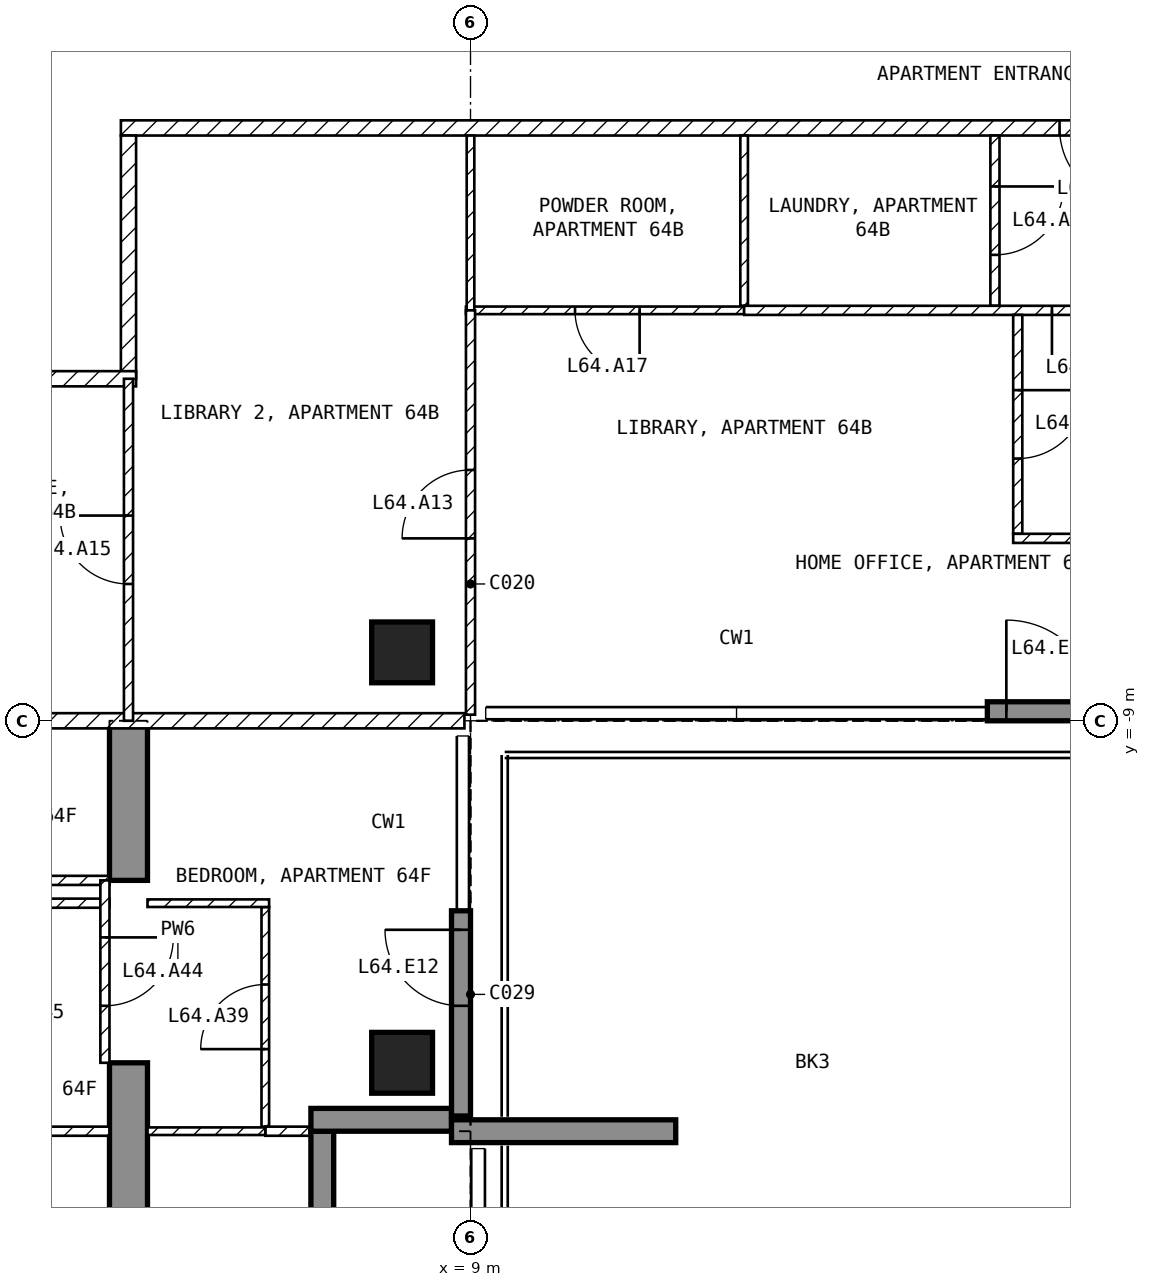
"""IFC4 building model, lengths in metres.
Left out: names, types, materials, properties, quantities, classifications, styles, units other than length and angle.
Written with IfcOpenShell. Run it as: python <this file> out.ifc"""

import sys

from ifc_helpers import new_model, si_unit, direction, frame, frame_2d, origin, origin_2d, place, context, subcontext, project, spatial, polyline, rectangle, outline, extrude, element, fill, save


model = new_model("IFC4")
c1 = context("Model", 3, precision=1e-05, world=origin(), true_north=direction((0.0, 1.0)))
c2 = subcontext(c1, "Body", "Model", "MODEL_VIEW")
j1 = project(units=[si_unit("LENGTHUNIT", "METRE"), si_unit("PLANEANGLEUNIT", "RADIAN")], contexts=[c1])
p1 = place(None, origin())
s1 = spatial("IfcSite", under=j1, at=p1, CompositionType="ELEMENT")
p2 = place(p1, origin())
s2 = spatial("IfcBuilding", under=s1, at=p2, CompositionType="ELEMENT")
p3 = place(p2, frame((0.0, 0.0, 253.5)))
s3 = spatial("IfcBuildingStorey", under=s2, at=p3, CompositionType="ELEMENT", Elevation=253.5)
for number, where, z_axis, x_axis in (
    (1, (8.1, -13.5, -0.25), (0.0, 0.0, 1.0), (1.0, 0.0, 0.0)),
    (2, (8.1, -8.1, -0.25), (0.0, 0.0, 1.0), (1.0, 0.0, 0.0)),
):
    element("IfcColumn", number, at=place(p3, frame(where, z_axis=z_axis, x_axis=x_axis)), inside=s3, PredefinedType="COLUMN", context=c2, shape_type="SweptSolid", body=[
        extrude(rectangle(XDim=0.8, YDim=0.8, at=origin_2d()), origin(), (0.0, 0.0, 1.0), 3.5),
    ])
p4 = place(p3, frame((4.25, -16.7, -0.25), z_axis=(1.0, 0.0, 0.0), x_axis=(0.0, 1.0, 0.0)))
e3 = element("IfcWall", 3, at=p4, inside=s3, PredefinedType="SHEAR", context=c2, shape_type="SweptSolid", body=[
    extrude(outline(polyline([(0.0, 0.0), (3.2, 0.0), (3.2, 2.65), (5.6, 2.65), (5.6, 0.0), (7.7, 0.0), (7.7, 3.5), (0.0, 3.5), (0.0, 0.0)])), origin(), (0.0, 0.0, 1.0), 0.5),
])
p5 = place(p3, frame((8.875, -14.2, 0.0), z_axis=(0.0, 0.0, 1.0), x_axis=(0.0, 1.0, 0.0)))
e4 = element("IfcWall", 4, at=p5, inside=s3, PredefinedType="SOLIDWALL", context=c2, shape_type="SweptSolid", body=[
    extrude(rectangle(XDim=2.7, YDim=0.25, at=frame_2d((1.35, 0.0))), origin(), (0.0, 0.0, 1.0), 3.25),
])
p6 = place(p5, frame((1.45, 0.0, 0.0)))
e5 = element("IfcOpeningElement", 5, at=p6, cuts=e4, PredefinedType="OPENING", context=c2, shape_type="SweptSolid", body=[
    extrude(rectangle(XDim=1.0, YDim=2.4, at=frame_2d((0.5, 1.2))), frame((0.0, 0.135, 0.0), z_axis=(0.0, -1.0, 0.0), x_axis=(1.0, 0.0, 0.0)), (0.0, 0.0, 1.0), 0.27),
])
p7 = place(p3, frame((15.8, -8.875, 0.0), z_axis=(0.0, 0.0, 1.0), x_axis=(1.0, 0.0, 0.0)))
e6 = element("IfcWall", 6, at=p7, inside=s3, PredefinedType="SOLIDWALL", context=c2, shape_type="SweptSolid", body=[
    extrude(rectangle(XDim=2.14, YDim=0.25, at=frame_2d((1.07, 0.0))), origin(), (0.0, 0.0, 1.0), 3.25),
])
p8 = place(p7, frame((0.25, 0.0, 0.0)))
e7 = element("IfcOpeningElement", 7, at=p8, cuts=e6, PredefinedType="OPENING", context=c2, shape_type="SweptSolid", body=[
    extrude(rectangle(XDim=1.2, YDim=2.4, at=frame_2d((0.6, 1.2))), frame((0.0, 0.135, 0.0), z_axis=(0.0, -1.0, 0.0), x_axis=(1.0, 0.0, 0.0)), (0.0, 0.0, 1.0), 0.27),
])
p9 = place(p3, frame((7.05, -16.2, 0.0), z_axis=(0.0, 0.0, 1.0), x_axis=(0.0, 1.0, 0.0)))
e8 = element("IfcWall", 8, at=p9, inside=s3, PredefinedType="SOLIDWALL", context=c2, shape_type="SweptSolid", body=[
    extrude(rectangle(XDim=1.8, YDim=0.3, at=frame_2d((0.9, 0.0))), origin(), (0.0, 0.0, 1.0), 3.25),
])
p10 = place(p3, frame((6.9, -14.25, 0.0), z_axis=(0.0, 0.0, 1.0), x_axis=(1.0, 0.0, 0.0)))
e9 = element("IfcWall", 9, at=p10, inside=s3, PredefinedType="SOLIDWALL", context=c2, shape_type="SweptSolid", body=[
    extrude(rectangle(XDim=1.85, YDim=0.3, at=frame_2d((0.925, 0.0))), origin(), (0.0, 0.0, 1.0), 3.25),
])
p11 = place(p3, frame((8.75, -14.4, 0.0), z_axis=(0.0, 0.0, 1.0), x_axis=(1.0, 0.0, 0.0)))
e10 = element("IfcWall", 10, at=p11, inside=s3, PredefinedType="SOLIDWALL", context=c2, shape_type="SweptSolid", body=[
    extrude(rectangle(XDim=2.95, YDim=0.3, at=frame_2d((1.475, 0.0))), origin(), (0.0, 0.0, 1.0), 3.25),
])
p12 = place(p3, frame((21.6, -1.2, 0.0), z_axis=(0.0, 0.0, 1.0), x_axis=(-1.0, 0.0, 0.0)))
e11 = element("IfcWall", 11, at=p12, inside=s3, PredefinedType="PARTITIONING", context=c2, shape_type="SweptSolid", body=[
    extrude(rectangle(XDim=17.2, YDim=0.2, at=frame_2d((8.6, 0.0))), origin(), (0.0, 0.0, 1.0), 3.25),
])
p13 = place(p12, frame((3.85, 0.0, 0.0)))
e12 = element("IfcOpeningElement", 12, at=p13, cuts=e11, PredefinedType="OPENING", context=c2, shape_type="SweptSolid", body=[
    extrude(rectangle(XDim=1.0, YDim=2.1, at=frame_2d((0.5, 1.05))), frame((0.0, 0.11, 0.0), z_axis=(0.0, -1.0, 0.0), x_axis=(1.0, 0.0, 0.0)), (0.0, 0.0, 1.0), 0.22),
])
p14 = place(p3, frame((4.5, -1.3, 0.0), z_axis=(0.0, 0.0, 1.0), x_axis=(0.0, -1.0, 0.0)))
e13 = element("IfcWall", 13, at=p14, inside=s3, PredefinedType="PARTITIONING", context=c2, shape_type="SweptSolid", body=[
    extrude(rectangle(XDim=3.2, YDim=0.2, at=frame_2d((1.6, 0.0))), origin(), (0.0, 0.0, 1.0), 3.25),
])
p15 = place(p3, frame((4.6, -4.5, 0.0), z_axis=(0.0, 0.0, 1.0), x_axis=(-1.0, 0.0, 0.0)))
e14 = element("IfcWall", 14, at=p15, inside=s3, PredefinedType="PARTITIONING", context=c2, shape_type="SweptSolid", body=[
    extrude(rectangle(XDim=3.5, YDim=0.2, at=frame_2d((1.75, 0.0))), origin(), (0.0, 0.0, 1.0), 3.25),
])
p16 = place(p3, frame((8.92, -9.0, 0.0), z_axis=(0.0, 0.0, 1.0), x_axis=(-1.0, 0.0, 0.0)))
e15 = element("IfcWall", 15, at=p16, inside=s3, PredefinedType="PARTITIONING", context=c2, shape_type="SweptSolid", body=[
    extrude(rectangle(XDim=17.84, YDim=0.2, at=frame_2d((8.92, 0.0))), origin(), (0.0, 0.0, 1.0), 3.25),
])
p17 = place(p16, frame((8.42, 0.0, 0.0)))
e16 = element("IfcOpeningElement", 16, at=p17, cuts=e15, PredefinedType="OPENING", context=c2, shape_type="SweptSolid", body=[
    extrude(rectangle(XDim=1.0, YDim=2.1, at=frame_2d((0.5, 1.05))), frame((0.0, 0.11, 0.0), z_axis=(0.0, -1.0, 0.0), x_axis=(1.0, 0.0, 0.0)), (0.0, 0.0, 1.0), 0.22),
])
p18 = place(p3, frame((12.6, -1.3, 0.0), z_axis=(0.0, 0.0, 1.0), x_axis=(0.0, -1.0, 0.0)))
e17 = element("IfcWall", 17, at=p18, inside=s3, PredefinedType="PARTITIONING", context=c2, shape_type="SweptSolid", body=[
    extrude(rectangle(XDim=2.24, YDim=0.1, at=frame_2d((1.12, 0.0))), origin(), (0.0, 0.0, 1.0), 3.25),
])
p19 = place(p3, frame((12.6, -3.6, 0.0), z_axis=(0.0, 0.0, 1.0), x_axis=(-1.0, 0.0, 0.0)))
e18 = element("IfcWall", 18, at=p19, inside=s3, PredefinedType="PARTITIONING", context=c2, shape_type="SweptSolid", body=[
    extrude(rectangle(XDim=3.66, YDim=0.1, at=frame_2d((1.83, 0.0))), origin(), (0.0, 0.0, 1.0), 3.25),
])
p20 = place(p19, frame((1.375, 0.0, 0.0)))
e19 = element("IfcOpeningElement", 19, at=p20, cuts=e18, PredefinedType="OPENING", context=c2, shape_type="SweptSolid", body=[
    extrude(rectangle(XDim=0.85, YDim=2.1, at=frame_2d((0.425, 1.05))), frame((0.0, 0.06, 0.0), z_axis=(0.0, -1.0, 0.0), x_axis=(1.0, 0.0, 0.0)), (0.0, 0.0, 1.0), 0.12),
])
p21 = place(p3, frame((9.0, -3.6, 0.0), z_axis=(0.0, 0.0, 1.0), x_axis=(0.0, 1.0, 0.0)))
e20 = element("IfcWall", 20, at=p21, inside=s3, PredefinedType="PARTITIONING", context=c2, shape_type="SweptSolid", body=[
    extrude(rectangle(XDim=2.3, YDim=0.1, at=frame_2d((1.15, 0.0))), origin(), (0.0, 0.0, 1.0), 3.25),
])
p22 = place(p3, frame((15.9, -1.3, 0.0), z_axis=(0.0, 0.0, 1.0), x_axis=(0.0, -1.0, 0.0)))
e21 = element("IfcWall", 21, at=p22, inside=s3, PredefinedType="PARTITIONING", context=c2, shape_type="SweptSolid", body=[
    extrude(rectangle(XDim=2.24, YDim=0.12, at=frame_2d((1.12, 0.0))), origin(), (0.0, 0.0, 1.0), 3.25),
])
p23 = place(p22, frame((0.67, 0.0, 0.0)))
e22 = element("IfcOpeningElement", 22, at=p23, cuts=e21, PredefinedType="OPENING", context=c2, shape_type="SweptSolid", body=[
    extrude(rectangle(XDim=0.9, YDim=2.1, at=frame_2d((0.45, 1.05))), frame((0.0, 0.07, 0.0), z_axis=(0.0, -1.0, 0.0), x_axis=(1.0, 0.0, 0.0)), (0.0, 0.0, 1.0), 0.14),
])
p24 = place(p3, frame((21.6, -3.6, 0.0), z_axis=(0.0, 0.0, 1.0), x_axis=(-1.0, 0.0, 0.0)))
e23 = element("IfcWall", 23, at=p24, inside=s3, PredefinedType="PARTITIONING", context=c2, shape_type="SweptSolid", body=[
    extrude(rectangle(XDim=9.0, YDim=0.12, at=frame_2d((4.5, 0.0))), origin(), (0.0, 0.0, 1.0), 3.25),
])
p25 = place(p24, frame((4.05, 0.0, 0.0)))
e24 = element("IfcOpeningElement", 24, at=p25, cuts=e23, PredefinedType="OPENING", context=c2, shape_type="SweptSolid", body=[
    extrude(rectangle(XDim=0.9, YDim=2.1, at=frame_2d((0.45, 1.05))), frame((0.0, 0.07, 0.0), z_axis=(0.0, -1.0, 0.0), x_axis=(1.0, 0.0, 0.0)), (0.0, 0.0, 1.0), 0.14),
])
p26 = place(p3, frame((16.2, -3.66, 0.0), z_axis=(0.0, 0.0, 1.0), x_axis=(0.0, -1.0, 0.0)))
e25 = element("IfcWall", 25, at=p26, inside=s3, PredefinedType="PARTITIONING", context=c2, shape_type="SweptSolid", body=[
    extrude(rectangle(XDim=2.88, YDim=0.12, at=frame_2d((1.44, 0.0))), origin(), (0.0, 0.0, 1.0), 3.25),
])
p27 = place(p26, frame((0.99, 0.0, 0.0)))
e26 = element("IfcOpeningElement", 26, at=p27, cuts=e25, PredefinedType="OPENING", context=c2, shape_type="SweptSolid", body=[
    extrude(rectangle(XDim=0.9, YDim=2.1, at=frame_2d((0.45, 1.05))), frame((0.0, 0.07, 0.0), z_axis=(0.0, -1.0, 0.0), x_axis=(1.0, 0.0, 0.0)), (0.0, 0.0, 1.0), 0.14),
])
p28 = place(p3, frame((16.14, -6.6, 0.0), z_axis=(0.0, 0.0, 1.0), x_axis=(1.0, 0.0, 0.0)))
e27 = element("IfcWall", 27, at=p28, inside=s3, PredefinedType="PARTITIONING", context=c2, shape_type="SweptSolid", body=[
    extrude(rectangle(XDim=1.92, YDim=0.12, at=frame_2d((0.96, 0.0))), origin(), (0.0, 0.0, 1.0), 3.25),
])
p29 = place(p3, frame((9.0, -8.92, 0.0), z_axis=(0.0, 0.0, 1.0), x_axis=(0.0, 1.0, 0.0)))
e28 = element("IfcWall", 28, at=p29, inside=s3, PredefinedType="PARTITIONING", context=c2, shape_type="SweptSolid", body=[
    extrude(rectangle(XDim=5.32, YDim=0.12, at=frame_2d((2.66, 0.0))), origin(), (0.0, 0.0, 1.0), 3.25),
])
p30 = place(p29, frame((2.32, 0.0, 0.0)))
e29 = element("IfcOpeningElement", 29, at=p30, cuts=e28, PredefinedType="OPENING", context=c2, shape_type="SweptSolid", body=[
    extrude(rectangle(XDim=0.9, YDim=2.1, at=frame_2d((0.45, 1.05))), frame((0.0, 0.07, 0.0), z_axis=(0.0, -1.0, 0.0), x_axis=(1.0, 0.0, 0.0)), (0.0, 0.0, 1.0), 0.14),
])
p31 = place(p3, frame((4.5, -9.0, 0.0), z_axis=(0.0, 0.0, 1.0), x_axis=(0.0, 1.0, 0.0)))
e30 = element("IfcWall", 30, at=p31, inside=s3, PredefinedType="PARTITIONING", context=c2, shape_type="SweptSolid", body=[
    extrude(rectangle(XDim=4.5, YDim=0.12, at=frame_2d((2.25, 0.0))), origin(), (0.0, 0.0, 1.0), 3.25),
])
p32 = place(p31, frame((1.8, 0.0, 0.0)))
e31 = element("IfcOpeningElement", 31, at=p32, cuts=e30, PredefinedType="OPENING", context=c2, shape_type="SweptSolid", body=[
    extrude(rectangle(XDim=0.9, YDim=2.1, at=frame_2d((0.45, 1.05))), frame((0.0, 0.07, 0.0), z_axis=(0.0, -1.0, 0.0), x_axis=(1.0, 0.0, 0.0)), (0.0, 0.0, 1.0), 0.14),
])
p33 = place(p3, frame((4.25, -11.1, 0.0), z_axis=(0.0, 0.0, 1.0), x_axis=(-1.0, 0.0, 0.0)))
e32 = element("IfcWall", 32, at=p33, inside=s3, PredefinedType="PARTITIONING", context=c2, shape_type="SweptSolid", body=[
    extrude(rectangle(XDim=6.35, YDim=0.12, at=frame_2d((3.175, 0.0))), origin(), (0.0, 0.0, 1.0), 3.25),
])
p34 = place(p33, frame((3.825, 0.0, 0.0)))
e33 = element("IfcOpeningElement", 33, at=p34, cuts=e32, PredefinedType="OPENING", context=c2, shape_type="SweptSolid", body=[
    extrude(rectangle(XDim=0.9, YDim=2.1, at=frame_2d((0.45, 1.05))), frame((0.0, 0.07, 0.0), z_axis=(0.0, -1.0, 0.0), x_axis=(1.0, 0.0, 0.0)), (0.0, 0.0, 1.0), 0.14),
])
p35 = place(p3, frame((4.25, -11.4, 0.0), z_axis=(0.0, 0.0, 1.0), x_axis=(-1.0, 0.0, 0.0)))
e34 = element("IfcWall", 34, at=p35, inside=s3, PredefinedType="PARTITIONING", context=c2, shape_type="SweptSolid", body=[
    extrude(rectangle(XDim=3.81, YDim=0.12, at=frame_2d((1.905, 0.0))), origin(), (0.0, 0.0, 1.0), 3.25),
])
p36 = place(p3, frame((4.25, -14.4, 0.0), z_axis=(0.0, 0.0, 1.0), x_axis=(-1.0, 0.0, 0.0)))
e35 = element("IfcWall", 35, at=p36, inside=s3, PredefinedType="PARTITIONING", context=c2, shape_type="SweptSolid", body=[
    extrude(rectangle(XDim=8.5, YDim=0.12, at=frame_2d((4.25, 0.0))), origin(), (0.0, 0.0, 1.0), 3.25),
])
p37 = place(p36, frame((5.675, 0.0, 0.0)))
e36 = element("IfcOpeningElement", 36, at=p37, cuts=e35, PredefinedType="OPENING", context=c2, shape_type="SweptSolid", body=[
    extrude(rectangle(XDim=0.9, YDim=2.1, at=frame_2d((0.45, 1.05))), frame((0.0, 0.07, 0.0), z_axis=(0.0, -1.0, 0.0), x_axis=(1.0, 0.0, 0.0)), (0.0, 0.0, 1.0), 0.14),
])
p38 = place(p3, frame((6.3, -14.34, 0.0), z_axis=(0.0, 0.0, 1.0), x_axis=(0.0, 1.0, 0.0)))
e37 = element("IfcWall", 37, at=p38, inside=s3, PredefinedType="PARTITIONING", context=c2, shape_type="SweptSolid", body=[
    extrude(rectangle(XDim=2.89, YDim=0.1, at=frame_2d((1.445, 0.0))), origin(), (0.0, 0.0, 1.0), 3.25),
])
p39 = place(p38, frame((1.02, 0.0, 0.0)))
e38 = element("IfcOpeningElement", 38, at=p39, cuts=e37, PredefinedType="OPENING", context=c2, shape_type="SweptSolid", body=[
    extrude(rectangle(XDim=0.85, YDim=2.1, at=frame_2d((0.425, 1.05))), frame((0.0, 0.06, 0.0), z_axis=(0.0, -1.0, 0.0), x_axis=(1.0, 0.0, 0.0)), (0.0, 0.0, 1.0), 0.12),
])
p40 = place(p3, frame((6.35, -11.4, 0.0), z_axis=(0.0, 0.0, 1.0), x_axis=(-1.0, 0.0, 0.0)))
e39 = element("IfcWall", 39, at=p40, inside=s3, PredefinedType="PARTITIONING", context=c2, shape_type="SweptSolid", body=[
    extrude(rectangle(XDim=1.6, YDim=0.1, at=frame_2d((0.8, 0.0))), origin(), (0.0, 0.0, 1.0), 3.25),
])
p41 = place(p3, frame((7.12, -14.4, 0.0), z_axis=(0.0, 0.0, 1.0), x_axis=(-1.0, 0.0, 0.0)))
e40 = element("IfcWall", 40, at=p41, inside=s3, PredefinedType="PARTITIONING", context=c2, shape_type="SweptSolid", body=[
    extrude(rectangle(XDim=0.82, YDim=0.12, at=frame_2d((0.41, 0.0))), origin(), (0.0, 0.0, 1.0), 3.25),
])
p42 = place(p3, frame((6.3, -14.4, 0.0), z_axis=(0.0, 0.0, 1.0), x_axis=(-1.0, 0.0, 0.0)))
e41 = element("IfcWall", 41, at=p42, inside=s3, PredefinedType="PARTITIONING", context=c2, shape_type="SweptSolid", body=[
    extrude(rectangle(XDim=1.55, YDim=0.1, at=frame_2d((0.775, 0.0))), origin(), (0.0, 0.0, 1.0), 3.25),
])
p43 = place(p3, frame((4.19, -11.1, 0.0), z_axis=(0.0, 0.0, 1.0), x_axis=(0.0, -1.0, 0.0)))
e42 = element("IfcWall", 42, at=p43, inside=s3, PredefinedType="PARTITIONING", context=c2, shape_type="SweptSolid", body=[
    extrude(rectangle(XDim=2.4, YDim=0.12, at=frame_2d((1.2, 0.0))), origin(), (0.0, 0.0, 1.0), 2.4),
])
p44 = place(p43, frame((0.75, 0.0, 0.0)))
e43 = element("IfcOpeningElement", 43, at=p44, cuts=e42, PredefinedType="OPENING", context=c2, shape_type="SweptSolid", body=[
    extrude(rectangle(XDim=0.9, YDim=2.1, at=frame_2d((0.45, 1.05))), frame((0.0, 0.07, 0.0), z_axis=(0.0, -1.0, 0.0), x_axis=(1.0, 0.0, 0.0)), (0.0, 0.0, 1.0), 0.14),
])
p45 = place(p6, origin())
e44 = element("IfcDoor", 44, at=p45, inside=s3, OperationType="SINGLE_SWING_RIGHT", PredefinedType="DOOR", context=c2, shape_type="SweptSolid", body=[
    extrude(rectangle(XDim=1.0, YDim=2.4, at=frame_2d((0.5, 1.2))), frame((0.0, 0.025, 0.0), z_axis=(0.0, -1.0, 0.0), x_axis=(1.0, 0.0, 0.0)), (0.0, 0.0, 1.0), 0.05),
])
fill(e5, e44)
p46 = place(p8, origin())
e45 = element("IfcDoor", 45, at=p46, inside=s3, OperationType="SINGLE_SWING_LEFT", PredefinedType="DOOR", context=c2, shape_type="SweptSolid", body=[
    extrude(rectangle(XDim=1.2, YDim=2.4, at=frame_2d((0.6, 1.2))), frame((0.0, 0.025, 0.0), z_axis=(0.0, -1.0, 0.0), x_axis=(1.0, 0.0, 0.0)), (0.0, 0.0, 1.0), 0.05),
])
fill(e7, e45)
p47 = place(p25, origin())
e46 = element("IfcDoor", 46, at=p47, inside=s3, OperationType="SINGLE_SWING_RIGHT", PredefinedType="DOOR", context=c2, shape_type="SweptSolid", body=[
    extrude(rectangle(XDim=0.9, YDim=2.1, at=frame_2d((0.45, 1.05))), frame((0.0, 0.025, 0.0), z_axis=(0.0, -1.0, 0.0), x_axis=(1.0, 0.0, 0.0)), (0.0, 0.0, 1.0), 0.05),
])
fill(e24, e46)
p48 = place(p23, origin())
e47 = element("IfcDoor", 47, at=p48, inside=s3, OperationType="SINGLE_SWING_LEFT", PredefinedType="DOOR", context=c2, shape_type="SweptSolid", body=[
    extrude(rectangle(XDim=0.9, YDim=2.1, at=frame_2d((0.45, 1.05))), frame((0.0, 0.025, 0.0), z_axis=(0.0, -1.0, 0.0), x_axis=(1.0, 0.0, 0.0)), (0.0, 0.0, 1.0), 0.05),
])
fill(e22, e47)
p49 = place(p30, origin())
e48 = element("IfcDoor", 48, at=p49, inside=s3, OperationType="SINGLE_SWING_LEFT", PredefinedType="DOOR", context=c2, shape_type="SweptSolid", body=[
    extrude(rectangle(XDim=0.9, YDim=2.1, at=frame_2d((0.45, 1.05))), frame((0.0, 0.025, 0.0), z_axis=(0.0, -1.0, 0.0), x_axis=(1.0, 0.0, 0.0)), (0.0, 0.0, 1.0), 0.05),
])
fill(e29, e48)
p50 = place(p27, origin())
e49 = element("IfcDoor", 49, at=p50, inside=s3, OperationType="SINGLE_SWING_LEFT", PredefinedType="DOOR", context=c2, shape_type="SweptSolid", body=[
    extrude(rectangle(XDim=0.9, YDim=2.1, at=frame_2d((0.45, 1.05))), frame((0.0, 0.025, 0.0), z_axis=(0.0, -1.0, 0.0), x_axis=(1.0, 0.0, 0.0)), (0.0, 0.0, 1.0), 0.05),
])
fill(e26, e49)
p51 = place(p32, origin())
e50 = element("IfcDoor", 50, at=p51, inside=s3, OperationType="SINGLE_SWING_RIGHT", PredefinedType="DOOR", context=c2, shape_type="SweptSolid", body=[
    extrude(rectangle(XDim=0.9, YDim=2.1, at=frame_2d((0.45, 1.05))), frame((0.0, 0.025, 0.0), z_axis=(0.0, -1.0, 0.0), x_axis=(1.0, 0.0, 0.0)), (0.0, 0.0, 1.0), 0.05),
])
fill(e31, e50)
p52 = place(p20, origin())
e51 = element("IfcDoor", 51, at=p52, inside=s3, OperationType="SINGLE_SWING_LEFT", PredefinedType="DOOR", context=c2, shape_type="SweptSolid", body=[
    extrude(rectangle(XDim=0.85, YDim=2.1, at=frame_2d((0.425, 1.05))), frame((0.0, 0.025, 0.0), z_axis=(0.0, -1.0, 0.0), x_axis=(1.0, 0.0, 0.0)), (0.0, 0.0, 1.0), 0.05),
])
fill(e19, e51)
p53 = place(p39, origin())
e52 = element("IfcDoor", 52, at=p53, inside=s3, OperationType="SINGLE_SWING_LEFT", PredefinedType="DOOR", context=c2, shape_type="SweptSolid", body=[
    extrude(rectangle(XDim=0.85, YDim=2.1, at=frame_2d((0.425, 1.05))), frame((0.0, 0.025, 0.0), z_axis=(0.0, -1.0, 0.0), x_axis=(1.0, 0.0, 0.0)), (0.0, 0.0, 1.0), 0.05),
])
fill(e38, e52)
p54 = place(p13, origin())
e53 = element("IfcDoor", 53, at=p54, inside=s3, OperationType="SINGLE_SWING_LEFT", PredefinedType="DOOR", context=c2, shape_type="SweptSolid", body=[
    extrude(rectangle(XDim=1.0, YDim=2.1, at=frame_2d((0.5, 1.05))), frame((0.0, 0.025, 0.0), z_axis=(0.0, -1.0, 0.0), x_axis=(1.0, 0.0, 0.0)), (0.0, 0.0, 1.0), 0.05),
])
fill(e12, e53)
p55 = place(p44, origin())
e54 = element("IfcDoor", 54, at=p55, inside=s3, OperationType="SINGLE_SWING_LEFT", PredefinedType="DOOR", context=c2, shape_type="SweptSolid", body=[
    extrude(rectangle(XDim=0.9, YDim=2.1, at=frame_2d((0.45, 1.05))), frame((0.0, 0.025, 0.0), z_axis=(0.0, -1.0, 0.0), x_axis=(1.0, 0.0, 0.0)), (0.0, 0.0, 1.0), 0.05),
])
fill(e43, e54)
save(model, sys.argv[1])
